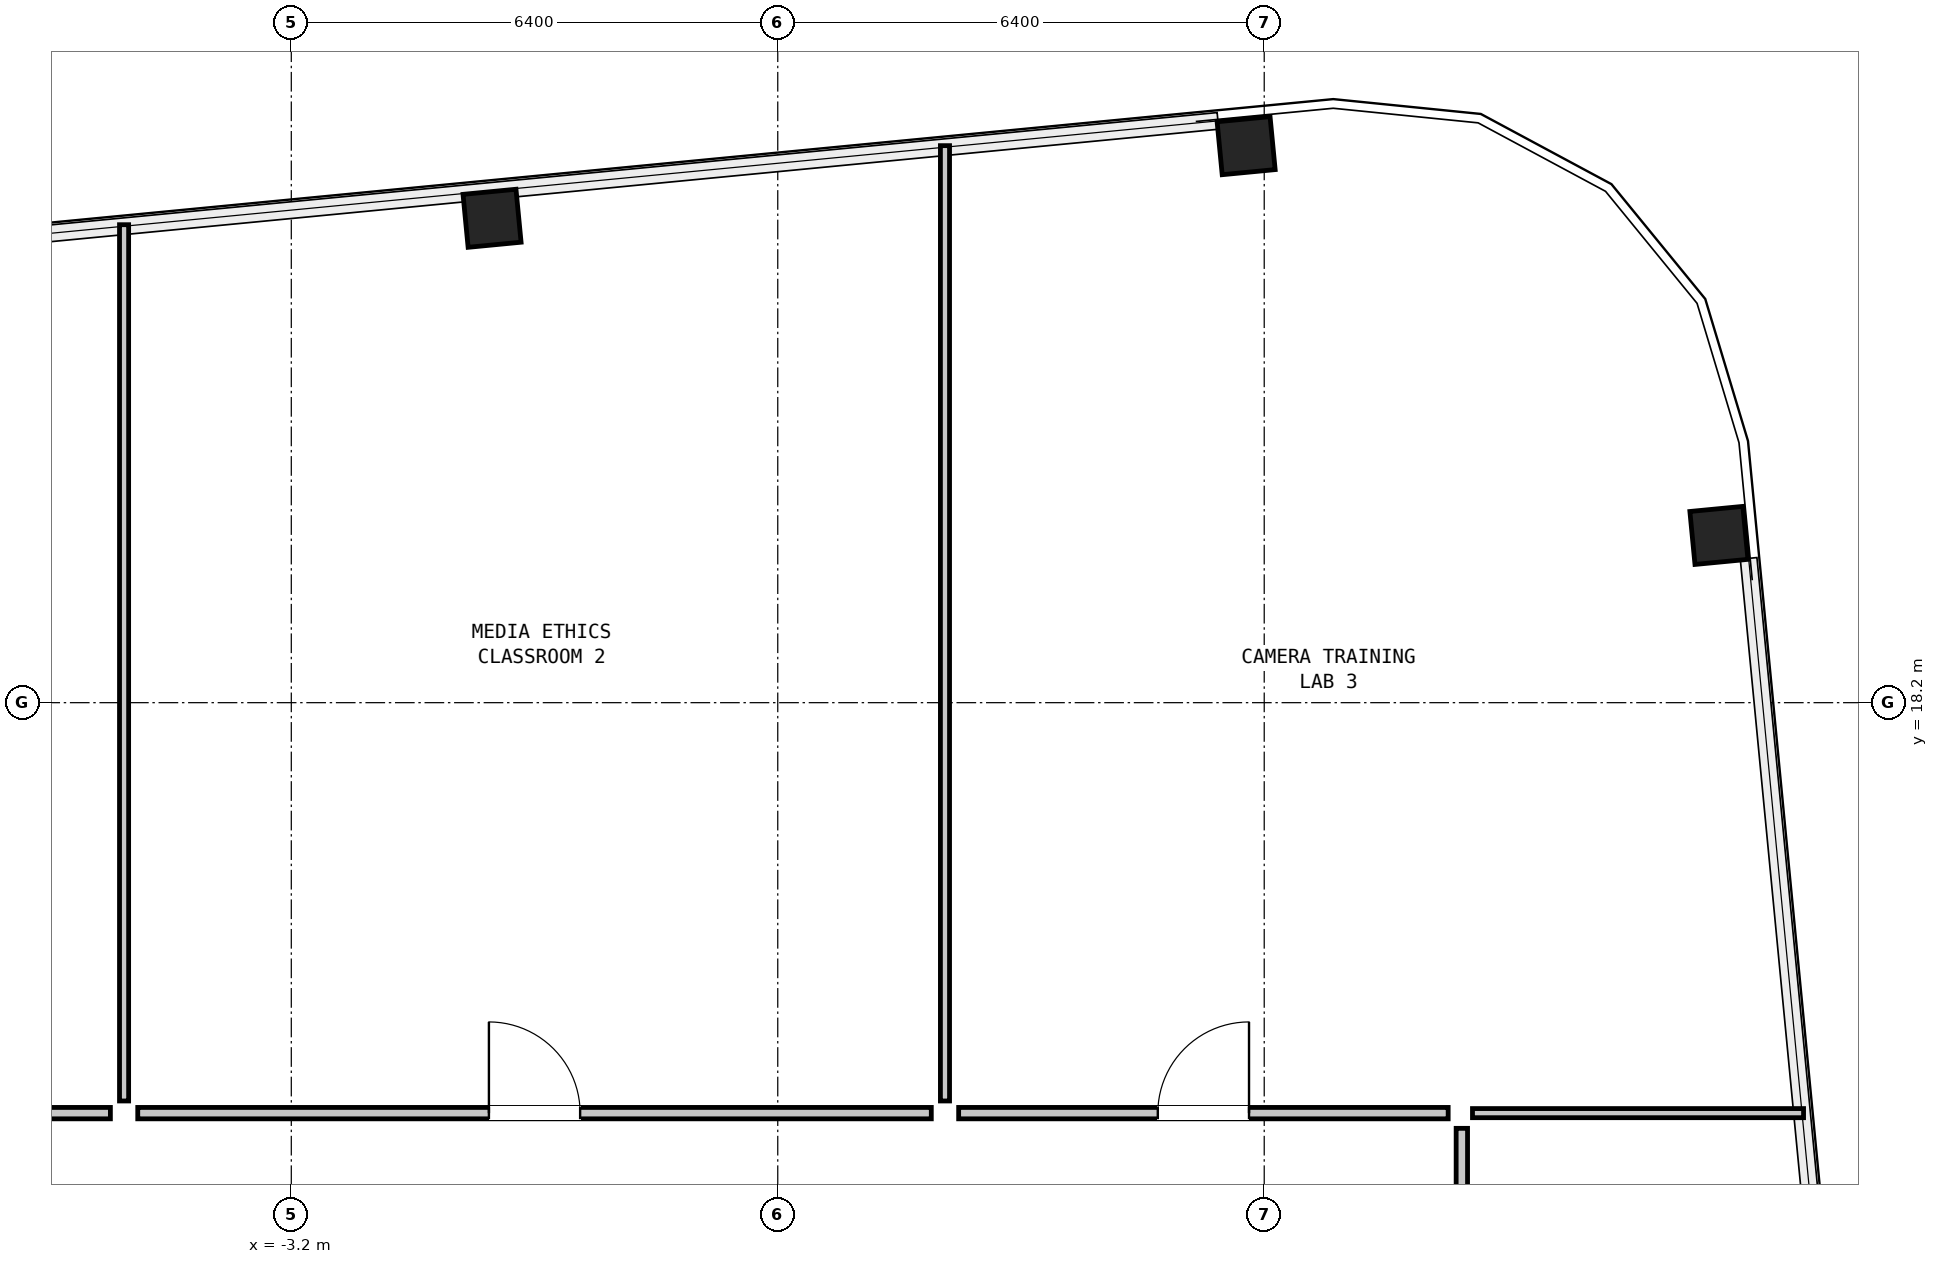
"""IFC4 building model, lengths in metres.
Left out: names, types, materials, properties, quantities, classifications, styles, units other than length and angle.
Written with IfcOpenShell. Run it as: python <this file> out.ifc"""

import sys

from ifc_helpers import new_model, si_unit, direction, frame, frame_2d, origin, origin_2d, place, context, subcontext, project, spatial, rectangle, hollow_rectangle, extrude, element, fill, save


model = new_model("IFC4")
c1 = context("Model", 3, precision=1e-05, world=origin(), true_north=direction((0.0, 1.0)))
c2 = subcontext(c1, "Body", "Model", "MODEL_VIEW")
j1 = project(units=[si_unit("LENGTHUNIT", "METRE"), si_unit("PLANEANGLEUNIT", "RADIAN")], contexts=[c1])
p1 = place(None, origin())
s1 = spatial("IfcSite", under=j1, at=p1, CompositionType="ELEMENT")
p2 = place(p1, origin())
s2 = spatial("IfcBuilding", under=s1, at=p2, CompositionType="ELEMENT")
p3 = place(p2, frame((0.0, 0.0, 183.6)))
s3 = spatial("IfcBuildingStorey", under=s2, at=p3, CompositionType="ELEMENT", Elevation=183.6)
for number, where, z_axis, x_axis in (
    (1, (15.582, 20.4, 0.0), (0.0, 0.0, 1.0), (-0.096, 0.995, 0.0)),
    (2, (9.362, 25.528, 0.0), (0.0, 0.0, 1.0), (0.995, 0.096, 0.0)),
    (3, (-0.559, 24.573, 0.0), (0.0, 0.0, 1.0), (0.995, 0.096, 0.0)),
):
    element("IfcColumn", number, at=place(p3, frame(where, z_axis=z_axis, x_axis=x_axis)), inside=s3, PredefinedType="COLUMN", context=c2, shape_type="SweptSolid", body=[
        extrude(hollow_rectangle(XDim=0.7, YDim=0.7, WallThickness=0.045, at=origin_2d()), origin(), (0.0, 0.0, 1.0), 4.35),
    ])
p4 = place(p3, frame((12.34, 12.8, 0.0), z_axis=(0.0, 0.0, 1.0), x_axis=(1.0, 0.0, 0.0)))
e4 = element("IfcWall", 4, at=p4, inside=s3, PredefinedType="PARTITIONING", context=c2, shape_type="SweptSolid", body=[
    extrude(rectangle(XDim=4.355, YDim=0.12, at=frame_2d((2.178, 0.0))), origin(), (0.0, 0.0, 1.0), 2.25),
])
p5 = place(p3, frame((-5.4, 12.96, 0.0), z_axis=(0.0, 0.0, 1.0), x_axis=(0.0, 1.0, 0.0)))
e5 = element("IfcWall", 5, at=p5, inside=s3, PredefinedType="PARTITIONING", context=c2, shape_type="SweptSolid", body=[
    extrude(rectangle(XDim=11.528, YDim=0.12, at=frame_2d((5.764, 0.0))), origin(), (0.0, 0.0, 1.0), 2.25),
])
p6 = place(p3, frame((5.4, 12.96, 0.0), z_axis=(0.0, 0.0, 1.0), x_axis=(0.0, 1.0, 0.0)))
e6 = element("IfcWall", 6, at=p6, inside=s3, PredefinedType="PARTITIONING", context=c2, shape_type="SweptSolid", body=[
    extrude(rectangle(XDim=12.568, YDim=0.12, at=frame_2d((6.284, 0.0))), origin(), (0.0, 0.0, 1.0), 4.07),
])
p7 = place(p3, frame((-12.02, 12.8, 0.0), z_axis=(0.0, 0.0, 1.0), x_axis=(1.0, 0.0, 0.0)))
e7 = element("IfcWall", 7, at=p7, inside=s3, PredefinedType="PARTITIONING", context=c2, shape_type="SweptSolid", body=[
    extrude(rectangle(XDim=6.44, YDim=0.15, at=frame_2d((3.22, 0.0))), origin(), (0.0, 0.0, 1.0), 2.25),
])
p8 = place(p7, frame((2.62, 0.0, 0.0)))
e8 = element("IfcOpeningElement", 8, at=p8, cuts=e7, PredefinedType="OPENING", context=c2, shape_type="SweptSolid", body=[
    extrude(rectangle(XDim=1.2, YDim=2.1, at=frame_2d((0.6, 1.05))), frame((0.0, 0.087, 0.0), z_axis=(0.0, -1.0, 0.0), x_axis=(1.0, 0.0, 0.0)), (0.0, 0.0, 1.0), 0.174),
])
p9 = place(p3, frame((-5.22, 12.8, 0.0), z_axis=(0.0, 0.0, 1.0), x_axis=(1.0, 0.0, 0.0)))
e9 = element("IfcWall", 9, at=p9, inside=s3, PredefinedType="PARTITIONING", context=c2, shape_type="SweptSolid", body=[
    extrude(rectangle(XDim=10.44, YDim=0.15, at=frame_2d((5.22, 0.0))), origin(), (0.0, 0.0, 1.0), 4.07),
])
p10 = place(p9, frame((4.62, 0.0, 0.0)))
e10 = element("IfcOpeningElement", 10, at=p10, cuts=e9, PredefinedType="OPENING", context=c2, shape_type="SweptSolid", body=[
    extrude(rectangle(XDim=1.2, YDim=2.1, at=frame_2d((0.6, 1.05))), frame((0.0, 0.087, 0.0), z_axis=(0.0, -1.0, 0.0), x_axis=(1.0, 0.0, 0.0)), (0.0, 0.0, 1.0), 0.174),
])
p11 = place(p3, frame((5.58, 12.8, 0.0), z_axis=(0.0, 0.0, 1.0), x_axis=(1.0, 0.0, 0.0)))
e11 = element("IfcWall", 11, at=p11, inside=s3, PredefinedType="PARTITIONING", context=c2, shape_type="SweptSolid", body=[
    extrude(rectangle(XDim=6.44, YDim=0.15, at=frame_2d((3.22, 0.0))), origin(), (0.0, 0.0, 1.0), 2.25),
])
p12 = place(p11, frame((2.62, 0.0, 0.0)))
e12 = element("IfcOpeningElement", 12, at=p12, cuts=e11, PredefinedType="OPENING", context=c2, shape_type="SweptSolid", body=[
    extrude(rectangle(XDim=1.2, YDim=2.1, at=frame_2d((0.6, 1.05))), frame((0.0, 0.087, 0.0), z_axis=(0.0, -1.0, 0.0), x_axis=(1.0, 0.0, 0.0)), (0.0, 0.0, 1.0), 0.174),
])
p13 = place(p3, frame((12.2, 3.8, 0.0), z_axis=(0.0, 0.0, 1.0), x_axis=(0.0, 1.0, 0.0)))
e13 = element("IfcWall", 13, at=p13, inside=s3, PredefinedType="PARTITIONING", context=c2, shape_type="SweptSolid", body=[
    extrude(rectangle(XDim=8.8, YDim=0.15, at=frame_2d((4.4, 0.0))), origin(), (0.0, 0.0, 1.0), 4.07),
])
p14 = place(p13, frame((3.925, 0.0, 0.0)))
e14 = element("IfcOpeningElement", 14, at=p14, cuts=e13, PredefinedType="OPENING", context=c2, shape_type="SweptSolid", body=[
    extrude(rectangle(XDim=0.95, YDim=2.1, at=frame_2d((0.475, 1.05))), frame((0.0, 0.087, 0.0), z_axis=(0.0, -1.0, 0.0), x_axis=(1.0, 0.0, 0.0)), (0.0, 0.0, 1.0), 0.174),
])
p15 = place(p10, origin())
e15 = element("IfcDoor", 15, at=p15, inside=s3, OperationType="SINGLE_SWING_LEFT", PredefinedType="DOOR", context=c2, shape_type="SweptSolid", body=[
    extrude(rectangle(XDim=1.2, YDim=2.1, at=frame_2d((0.6, 1.05))), frame((0.0, 0.025, 0.0), z_axis=(0.0, -1.0, 0.0), x_axis=(1.0, 0.0, 0.0)), (0.0, 0.0, 1.0), 0.05),
])
fill(e10, e15)
p16 = place(p12, origin())
e16 = element("IfcDoor", 16, at=p16, inside=s3, OperationType="SINGLE_SWING_RIGHT", PredefinedType="DOOR", context=c2, shape_type="SweptSolid", body=[
    extrude(rectangle(XDim=1.2, YDim=2.1, at=frame_2d((0.6, 1.05))), frame((0.0, 0.025, 0.0), z_axis=(0.0, -1.0, 0.0), x_axis=(1.0, 0.0, 0.0)), (0.0, 0.0, 1.0), 0.05),
])
fill(e12, e16)
save(model, sys.argv[1])
